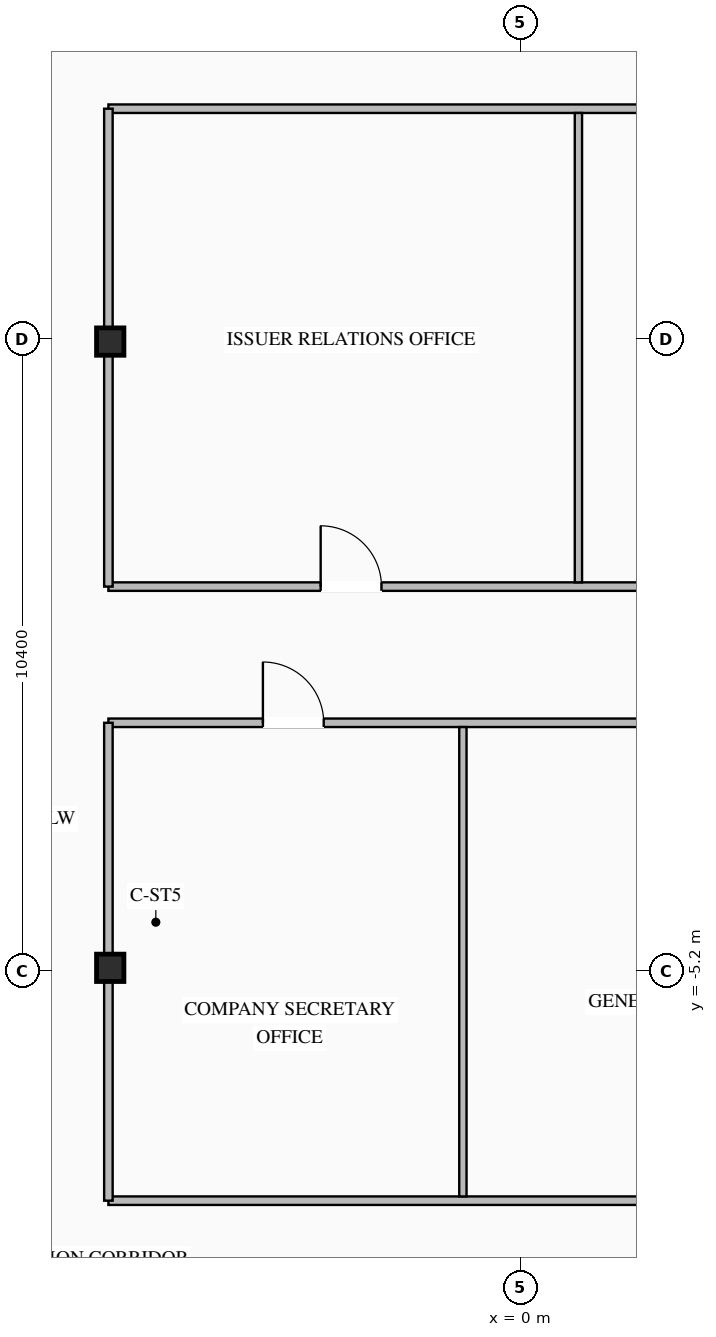
"""IFC4 building model, lengths in metres.
Left out: names, types, materials, properties, quantities, classifications, styles, units other than length and angle.
Written with IfcOpenShell. Run it as: python <this file> out.ifc"""

import sys

from ifc_helpers import new_model, si_unit, direction, frame, frame_2d, origin, origin_2d, place, context, subcontext, project, spatial, rectangle, i_section, extrude, element, fill, save


model = new_model("IFC4")
c1 = context("Model", 3, precision=1e-05, world=origin(), true_north=direction((0.0, 1.0)))
c2 = subcontext(c1, "Body", "Model", "MODEL_VIEW")
j1 = project(units=[si_unit("LENGTHUNIT", "METRE"), si_unit("PLANEANGLEUNIT", "RADIAN")], contexts=[c1])
p1 = place(None, origin())
s1 = spatial("IfcSite", under=j1, at=p1, CompositionType="ELEMENT")
p2 = place(p1, origin())
s2 = spatial("IfcBuilding", under=s1, at=p2, CompositionType="ELEMENT")
p3 = place(p2, frame((0.0, 0.0, 262.05)))
s3 = spatial("IfcBuildingStorey", under=s2, at=p3, CompositionType="ELEMENT", Elevation=262.05)
for number, where, z_axis, x_axis in (
    (1, (-6.75, -5.15, 0.0), (0.0, 0.0, 1.0), (1.0, 0.0, 0.0)),
    (2, (-6.75, 5.15, 0.0), (0.0, 0.0, 1.0), (1.0, 0.0, 0.0)),
):
    element("IfcColumn", number, at=place(p3, frame(where, z_axis=z_axis, x_axis=x_axis)), inside=s3, PredefinedType="COLUMN", context=c2, shape_type="SweptSolid", body=[
        extrude(i_section(OverallWidth=0.45, OverallDepth=0.45, WebThickness=0.022, FlangeThickness=0.032, at=origin_2d()), origin(), (0.0, 0.0, 1.0), 3.45),
    ])
p4 = place(p3, frame((-6.78, 1.12, 0.0), z_axis=(0.0, 0.0, 1.0), x_axis=(1.0, 0.0, 0.0)))
e3 = element("IfcWall", 3, at=p4, inside=s3, PredefinedType="STANDARD", context=c2, shape_type="SweptSolid", body=[
    extrude(rectangle(XDim=13.56, YDim=0.14, at=frame_2d((6.78, 0.0))), origin(), (0.0, 0.0, 1.0), 3.25),
])
p5 = place(p4, frame((3.491, 0.0, 0.0)))
e4 = element("IfcOpeningElement", 4, at=p5, cuts=e3, PredefinedType="OPENING", context=c2, shape_type="SweptSolid", body=[
    extrude(rectangle(XDim=1.0, YDim=2.08, at=frame_2d((0.5, 1.04))), frame((0.0, 0.08, 0.0), z_axis=(0.0, -1.0, 0.0), x_axis=(1.0, 0.0, 0.0)), (0.0, 0.0, 1.0), 0.16),
])
p6 = place(p4, frame((10.019, 0.0, 0.0)))
e5 = element("IfcOpeningElement", 5, at=p6, cuts=e3, PredefinedType="OPENING", context=c2, shape_type="SweptSolid", body=[
    extrude(rectangle(XDim=1.0, YDim=2.08, at=frame_2d((0.5, 1.04))), frame((0.0, 0.08, 0.0), z_axis=(0.0, -1.0, 0.0), x_axis=(1.0, 0.0, 0.0)), (0.0, 0.0, 1.0), 0.16),
])
p7 = place(p3, frame((-6.78, 8.98, 0.0), z_axis=(0.0, 0.0, 1.0), x_axis=(1.0, 0.0, 0.0)))
e6 = element("IfcWall", 6, at=p7, inside=s3, PredefinedType="STANDARD", context=c2, shape_type="SweptSolid", body=[
    extrude(rectangle(XDim=13.56, YDim=0.14, at=frame_2d((6.78, 0.0))), origin(), (0.0, 0.0, 1.0), 3.25),
])
p8 = place(p3, frame((-6.78, 1.12, 0.0), z_axis=(0.0, 0.0, 1.0), x_axis=(0.0, 1.0, 0.0)))
e7 = element("IfcWall", 7, at=p8, inside=s3, PredefinedType="STANDARD", context=c2, shape_type="SweptSolid", body=[
    extrude(rectangle(XDim=7.86, YDim=0.14, at=frame_2d((3.93, 0.0))), origin(), (0.0, 0.0, 1.0), 2.645),
])
p9 = place(p3, frame((0.95, 1.19, 0.0), z_axis=(0.0, 0.0, 1.0), x_axis=(0.0, 1.0, 0.0)))
e8 = element("IfcWall", 8, at=p9, inside=s3, PredefinedType="STANDARD", context=c2, shape_type="SweptSolid", body=[
    extrude(rectangle(XDim=7.72, YDim=0.12, at=frame_2d((3.86, 0.0))), origin(), (0.0, 0.0, 1.0), 3.25),
])
p10 = place(p3, frame((-6.78, -1.12, 0.0), z_axis=(0.0, 0.0, 1.0), x_axis=(1.0, 0.0, 0.0)))
e9 = element("IfcWall", 9, at=p10, inside=s3, PredefinedType="STANDARD", context=c2, shape_type="SweptSolid", body=[
    extrude(rectangle(XDim=13.56, YDim=0.14, at=frame_2d((6.78, 0.0))), origin(), (0.0, 0.0, 1.0), 3.25),
])
p11 = place(p10, frame((2.541, 0.0, 0.0)))
e10 = element("IfcOpeningElement", 10, at=p11, cuts=e9, PredefinedType="OPENING", context=c2, shape_type="SweptSolid", body=[
    extrude(rectangle(XDim=1.0, YDim=2.08, at=frame_2d((0.5, 1.04))), frame((0.0, 0.08, 0.0), z_axis=(0.0, -1.0, 0.0), x_axis=(1.0, 0.0, 0.0)), (0.0, 0.0, 1.0), 0.16),
])
p12 = place(p10, frame((9.069, 0.0, 0.0)))
e11 = element("IfcOpeningElement", 11, at=p12, cuts=e9, PredefinedType="OPENING", context=c2, shape_type="SweptSolid", body=[
    extrude(rectangle(XDim=1.0, YDim=2.08, at=frame_2d((0.5, 1.04))), frame((0.0, 0.08, 0.0), z_axis=(0.0, -1.0, 0.0), x_axis=(1.0, 0.0, 0.0)), (0.0, 0.0, 1.0), 0.16),
])
p13 = place(p3, frame((-6.78, -8.98, 0.0), z_axis=(0.0, 0.0, 1.0), x_axis=(1.0, 0.0, 0.0)))
e12 = element("IfcWall", 12, at=p13, inside=s3, PredefinedType="STANDARD", context=c2, shape_type="SweptSolid", body=[
    extrude(rectangle(XDim=13.56, YDim=0.14, at=frame_2d((6.78, 0.0))), origin(), (0.0, 0.0, 1.0), 3.25),
])
p14 = place(p3, frame((-6.78, -8.98, 0.0), z_axis=(0.0, 0.0, 1.0), x_axis=(0.0, 1.0, 0.0)))
e13 = element("IfcWall", 13, at=p14, inside=s3, PredefinedType="STANDARD", context=c2, shape_type="SweptSolid", body=[
    extrude(rectangle(XDim=7.86, YDim=0.14, at=frame_2d((3.93, 0.0))), origin(), (0.0, 0.0, 1.0), 2.645),
])
p15 = place(p3, frame((-0.95, -8.91, 0.0), z_axis=(0.0, 0.0, 1.0), x_axis=(0.0, 1.0, 0.0)))
e14 = element("IfcWall", 14, at=p15, inside=s3, PredefinedType="STANDARD", context=c2, shape_type="SweptSolid", body=[
    extrude(rectangle(XDim=7.72, YDim=0.12, at=frame_2d((3.86, 0.0))), origin(), (0.0, 0.0, 1.0), 3.25),
])
p16 = place(p5, origin())
e15 = element("IfcDoor", 15, at=p16, inside=s3, OperationType="SINGLE_SWING_LEFT", PredefinedType="DOOR", context=c2, shape_type="SweptSolid", body=[
    extrude(rectangle(XDim=1.0, YDim=2.08, at=frame_2d((0.5, 1.04))), frame((0.0, 0.025, 0.0), z_axis=(0.0, -1.0, 0.0), x_axis=(1.0, 0.0, 0.0)), (0.0, 0.0, 1.0), 0.05),
])
fill(e4, e15)
p17 = place(p11, origin())
e16 = element("IfcDoor", 16, at=p17, inside=s3, OperationType="SINGLE_SWING_LEFT", PredefinedType="DOOR", context=c2, shape_type="SweptSolid", body=[
    extrude(rectangle(XDim=1.0, YDim=2.08, at=frame_2d((0.5, 1.04))), frame((0.0, 0.025, 0.0), z_axis=(0.0, -1.0, 0.0), x_axis=(1.0, 0.0, 0.0)), (0.0, 0.0, 1.0), 0.05),
])
fill(e10, e16)
save(model, sys.argv[1])
